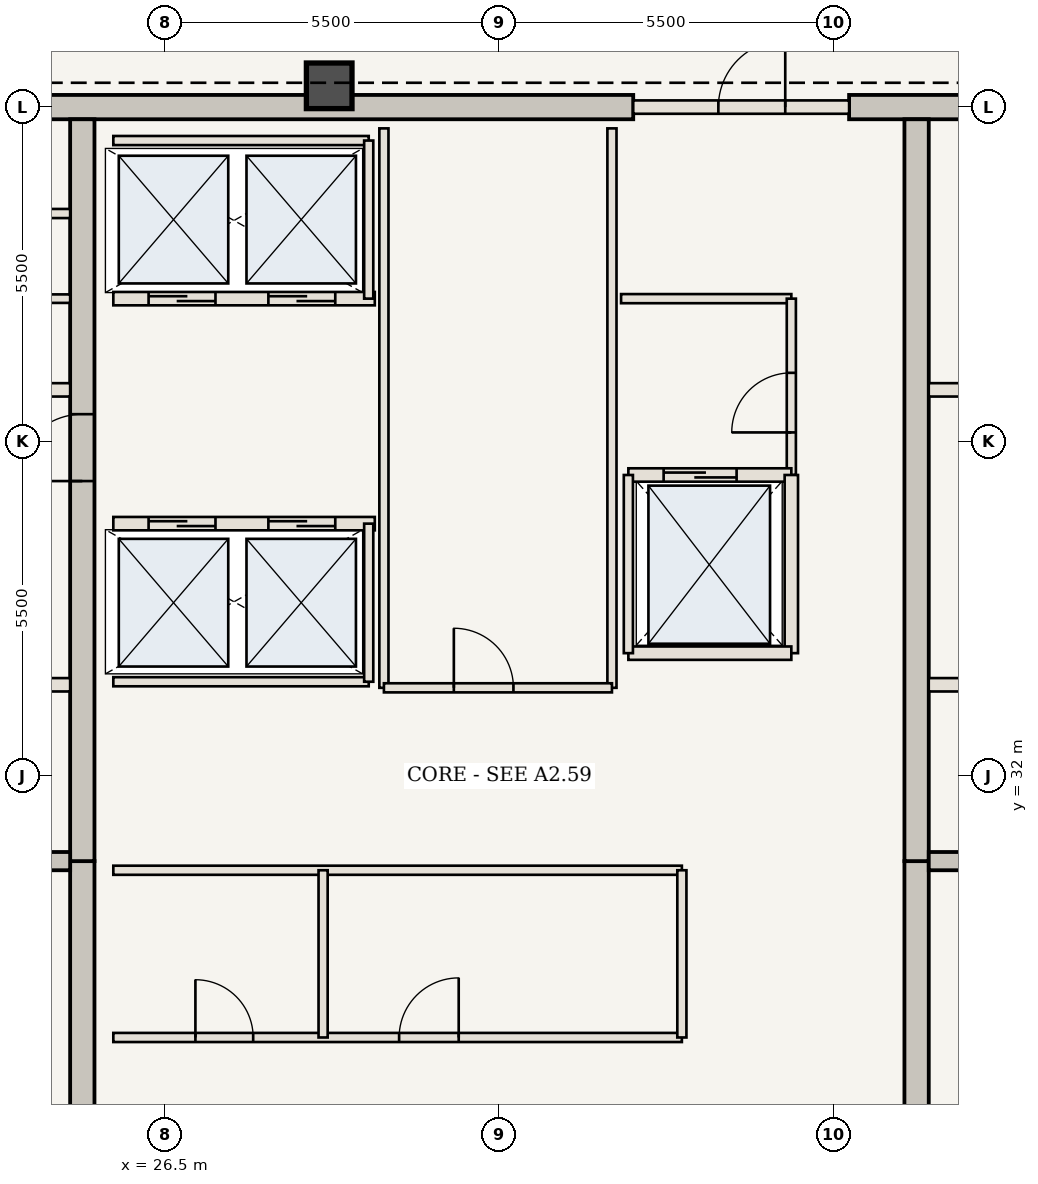
"""IFC4 building model, lengths in metres.
Left out: names, types, materials, properties, quantities, classifications, styles, units other than length and angle.
Written with IfcOpenShell. Run it as: python <this file> out.ifc"""

import sys

from ifc_helpers import new_model, si_unit, direction, frame, frame_2d, origin, origin_2d, place, context, subcontext, project, spatial, rectangle, extrude, element, fill, save


model = new_model("IFC4")
c1 = context("Model", 3, precision=1e-05, world=origin(), true_north=direction((0.0, 1.0)))
c2 = subcontext(c1, "Body", "Model", "MODEL_VIEW")
j1 = project(units=[si_unit("LENGTHUNIT", "METRE"), si_unit("PLANEANGLEUNIT", "RADIAN")], contexts=[c1])
p1 = place(None, origin())
s1 = spatial("IfcSite", under=j1, at=p1, CompositionType="ELEMENT")
p2 = place(p1, origin())
s2 = spatial("IfcBuilding", under=s1, at=p2, CompositionType="ELEMENT")
p3 = place(p2, frame((0.0, 0.0, 269.85)))
s3 = spatial("IfcBuildingStorey", under=s2, at=p3, CompositionType="ELEMENT", Elevation=269.85)
p4 = place(p3, frame((21.41, 43.0, 0.0), z_axis=(0.0, 0.0, 1.0), x_axis=(1.0, 0.0, 0.0)))
e1 = element("IfcWall", 1, at=p4, inside=s3, PredefinedType="SHEAR", context=c2, shape_type="SweptSolid", body=[
    extrude(rectangle(XDim=12.79, YDim=0.4, at=frame_2d((6.395, 0.0))), origin(), (0.0, 0.0, 1.0), 3.85),
])
p5 = place(p3, frame((37.75, 43.0, 0.0), z_axis=(0.0, 0.0, 1.0), x_axis=(1.0, 0.0, 0.0)))
e2 = element("IfcWall", 2, at=p5, inside=s3, PredefinedType="SHEAR", context=c2, shape_type="SweptSolid", body=[
    extrude(rectangle(XDim=4.84, YDim=0.4, at=frame_2d((2.42, 0.0))), origin(), (0.0, 0.0, 1.0), 3.85),
])
p6 = place(p3, frame((25.14, 21.15, 0.0), z_axis=(0.0, 0.0, 1.0), x_axis=(0.0, 1.0, 0.0)))
e3 = element("IfcWall", 3, at=p6, inside=s3, PredefinedType="SHEAR", context=c2, shape_type="SweptSolid", body=[
    extrude(rectangle(XDim=9.45, YDim=0.4, at=frame_2d((4.725, 0.0))), origin(), (0.0, 0.0, 1.0), 3.85),
])
p7 = place(p3, frame((25.14, 30.6, 0.0), z_axis=(0.0, 0.0, 1.0), x_axis=(0.0, 1.0, 0.0)))
e4 = element("IfcWall", 4, at=p7, inside=s3, PredefinedType="SHEAR", context=c2, shape_type="SweptSolid", body=[
    extrude(rectangle(XDim=12.2, YDim=0.4, at=frame_2d((6.1, 0.0))), origin(), (0.0, 0.0, 1.0), 3.85),
])
p8 = place(p7, frame((6.25, 0.0, 0.0)))
e5 = element("IfcOpeningElement", 5, at=p8, cuts=e4, PredefinedType="OPENING", context=c2, shape_type="SweptSolid", body=[
    extrude(rectangle(XDim=1.1, YDim=2.15, at=frame_2d((0.55, 1.075))), frame((0.0, 0.21, 0.0), z_axis=(0.0, -1.0, 0.0), x_axis=(1.0, 0.0, 0.0)), (0.0, 0.0, 1.0), 0.42),
])
p9 = place(p3, frame((38.86, 21.15, 0.0), z_axis=(0.0, 0.0, 1.0), x_axis=(0.0, 1.0, 0.0)))
e6 = element("IfcWall", 6, at=p9, inside=s3, PredefinedType="SHEAR", context=c2, shape_type="SweptSolid", body=[
    extrude(rectangle(XDim=9.45, YDim=0.4, at=frame_2d((4.725, 0.0))), origin(), (0.0, 0.0, 1.0), 3.85),
])
p10 = place(p3, frame((38.86, 30.6, 0.0), z_axis=(0.0, 0.0, 1.0), x_axis=(0.0, 1.0, 0.0)))
e7 = element("IfcWall", 7, at=p10, inside=s3, PredefinedType="SHEAR", context=c2, shape_type="SweptSolid", body=[
    extrude(rectangle(XDim=12.2, YDim=0.4, at=frame_2d((6.1, 0.0))), origin(), (0.0, 0.0, 1.0), 3.85),
])
p11 = place(p3, frame((29.2, 43.35, 0.0), z_axis=(0.0, 0.0, 1.0), x_axis=(1.0, 0.0, 0.0)))
e8 = element("IfcColumn", 8, at=p11, inside=s3, PredefinedType="COLUMN", context=c2, shape_type="SweptSolid", body=[
    extrude(rectangle(XDim=0.75, YDim=0.75, at=origin_2d()), origin(), (0.0, 0.0, 1.0), 3.85),
])
for number, where, z_axis, x_axis in (
    (9, (21.41, 30.6, 0.0), (0.0, 0.0, 1.0), (1.0, 0.0, 0.0)),
    (10, (39.06, 30.6, 0.0), (0.0, 0.0, 1.0), (1.0, 0.0, 0.0)),
):
    element("IfcWall", number, at=place(p3, frame(where, z_axis=z_axis, x_axis=x_axis)), inside=s3, PredefinedType="SHEAR", context=c2, shape_type="SweptSolid", body=[
        extrude(rectangle(XDim=3.53, YDim=0.3, at=frame_2d((1.765, 0.0))), origin(), (0.0, 0.0, 1.0), 3.685),
    ])
p12 = place(p3, frame((21.41, 33.5, 0.0), z_axis=(0.0, 0.0, 1.0), x_axis=(1.0, 0.0, 0.0)))
e11 = element("IfcWall", 11, at=p12, inside=s3, PredefinedType="STANDARD", context=c2, shape_type="SweptSolid", body=[
    extrude(rectangle(XDim=3.53, YDim=0.22, at=frame_2d((1.765, 0.0))), origin(), (0.0, 0.0, 1.0), 3.685),
])
p13 = place(p12, frame((0.75, 0.0, 0.0)))
e12 = element("IfcOpeningElement", 12, at=p13, cuts=e11, PredefinedType="OPENING", context=c2, shape_type="SweptSolid", body=[
    extrude(rectangle(XDim=1.2, YDim=2.2, at=frame_2d((0.6, 1.1))), frame((0.0, 0.12, 0.0), z_axis=(0.0, -1.0, 0.0), x_axis=(1.0, 0.0, 0.0)), (0.0, 0.0, 1.0), 0.24),
])
p14 = place(p3, frame((39.06, 33.5, 0.0), z_axis=(0.0, 0.0, 1.0), x_axis=(1.0, 0.0, 0.0)))
e13 = element("IfcWall", 13, at=p14, inside=s3, PredefinedType="STANDARD", context=c2, shape_type="SweptSolid", body=[
    extrude(rectangle(XDim=3.53, YDim=0.22, at=frame_2d((1.765, 0.0))), origin(), (0.0, 0.0, 1.0), 3.685),
])
p15 = place(p14, frame((1.55, 0.0, 0.0)))
e14 = element("IfcOpeningElement", 14, at=p15, cuts=e13, PredefinedType="OPENING", context=c2, shape_type="SweptSolid", body=[
    extrude(rectangle(XDim=1.2, YDim=2.2, at=frame_2d((0.6, 1.1))), frame((0.0, 0.12, 0.0), z_axis=(0.0, -1.0, 0.0), x_axis=(1.0, 0.0, 0.0)), (0.0, 0.0, 1.0), 0.24),
])
for number, where, z_axis, x_axis in (
    (15, (21.41, 38.35, 0.0), (0.0, 0.0, 1.0), (1.0, 0.0, 0.0)),
    (16, (39.06, 38.35, 0.0), (0.0, 0.0, 1.0), (1.0, 0.0, 0.0)),
):
    element("IfcWall", number, at=place(p3, frame(where, z_axis=z_axis, x_axis=x_axis)), inside=s3, PredefinedType="STANDARD", context=c2, shape_type="SweptSolid", body=[
        extrude(rectangle(XDim=3.53, YDim=0.22, at=frame_2d((1.765, 0.0))), origin(), (0.0, 0.0, 1.0), 3.685),
    ])
p16 = place(p3, frame((21.41, 39.85, 0.0), z_axis=(0.0, 0.0, 1.0), x_axis=(1.0, 0.0, 0.0)))
e17 = element("IfcWall", 17, at=p16, inside=s3, PredefinedType="STANDARD", context=c2, shape_type="SweptSolid", body=[
    extrude(rectangle(XDim=3.53, YDim=0.14, at=frame_2d((1.765, 0.0))), origin(), (0.0, 0.0, 1.0), 3.685),
])
p17 = place(p3, frame((21.41, 41.25, 0.0), z_axis=(0.0, 0.0, 1.0), x_axis=(1.0, 0.0, 0.0)))
e18 = element("IfcWall", 18, at=p17, inside=s3, PredefinedType="STANDARD", context=c2, shape_type="SweptSolid", body=[
    extrude(rectangle(XDim=3.53, YDim=0.15, at=frame_2d((1.765, 0.0))), origin(), (0.0, 0.0, 1.0), 3.685),
])
p18 = place(p3, frame((34.0, 39.85, 0.0), z_axis=(0.0, 0.0, 1.0), x_axis=(1.0, 0.0, 0.0)))
e19 = element("IfcWall", 19, at=p18, inside=s3, PredefinedType="STANDARD", context=c2, shape_type="SweptSolid", body=[
    extrude(rectangle(XDim=2.8, YDim=0.15, at=frame_2d((1.4, 0.0))), origin(), (0.0, 0.0, 1.0), 3.685),
])
p19 = place(p3, frame((36.8, 36.95, 0.0), z_axis=(0.0, 0.0, 1.0), x_axis=(0.0, 1.0, 0.0)))
e20 = element("IfcWall", 20, at=p19, inside=s3, PredefinedType="STANDARD", context=c2, shape_type="SweptSolid", body=[
    extrude(rectangle(XDim=2.9, YDim=0.15, at=frame_2d((1.45, 0.0))), origin(), (0.0, 0.0, 1.0), 3.685),
])
p20 = place(p19, frame((0.7, 0.0, 0.0)))
e21 = element("IfcOpeningElement", 21, at=p20, cuts=e20, PredefinedType="OPENING", context=c2, shape_type="SweptSolid", body=[
    extrude(rectangle(XDim=0.98, YDim=2.2, at=frame_2d((0.49, 1.1))), frame((0.0, 0.085, 0.0), z_axis=(0.0, -1.0, 0.0), x_axis=(1.0, 0.0, 0.0)), (0.0, 0.0, 1.0), 0.17),
])
p21 = place(p3, frame((25.65, 27.7, 0.0), z_axis=(0.0, 0.0, 1.0), x_axis=(1.0, 0.0, 0.0)))
e22 = element("IfcWall", 22, at=p21, inside=s3, PredefinedType="STANDARD", context=c2, shape_type="SweptSolid", body=[
    extrude(rectangle(XDim=9.35, YDim=0.15, at=frame_2d((4.675, 0.0))), origin(), (0.0, 0.0, 1.0), 3.685),
])
p22 = place(p21, frame((1.35, 0.0, 0.0)))
e23 = element("IfcOpeningElement", 23, at=p22, cuts=e22, PredefinedType="OPENING", context=c2, shape_type="SweptSolid", body=[
    extrude(rectangle(XDim=0.95, YDim=2.15, at=frame_2d((0.475, 1.075))), frame((0.0, 0.085, 0.0), z_axis=(0.0, -1.0, 0.0), x_axis=(1.0, 0.0, 0.0)), (0.0, 0.0, 1.0), 0.17),
])
p23 = place(p21, frame((4.7, 0.0, 0.0)))
e24 = element("IfcOpeningElement", 24, at=p23, cuts=e22, PredefinedType="OPENING", context=c2, shape_type="SweptSolid", body=[
    extrude(rectangle(XDim=0.98, YDim=2.2, at=frame_2d((0.49, 1.1))), frame((0.0, 0.085, 0.0), z_axis=(0.0, -1.0, 0.0), x_axis=(1.0, 0.0, 0.0)), (0.0, 0.0, 1.0), 0.17),
])
p24 = place(p3, frame((25.65, 30.45, 0.0), z_axis=(0.0, 0.0, 1.0), x_axis=(1.0, 0.0, 0.0)))
e25 = element("IfcWall", 25, at=p24, inside=s3, PredefinedType="STANDARD", context=c2, shape_type="SweptSolid", body=[
    extrude(rectangle(XDim=9.35, YDim=0.15, at=frame_2d((4.675, 0.0))), origin(), (0.0, 0.0, 1.0), 3.685),
])
for number, where, z_axis, x_axis in (
    (26, (29.1, 27.7, 0.0), (0.0, 0.0, 1.0), (0.0, 1.0, 0.0)),
    (27, (35.0, 27.7, 0.0), (0.0, 0.0, 1.0), (0.0, 1.0, 0.0)),
):
    element("IfcWall", number, at=place(p3, frame(where, z_axis=z_axis, x_axis=x_axis)), inside=s3, PredefinedType="STANDARD", context=c2, shape_type="SweptSolid", body=[
        extrude(rectangle(XDim=2.75, YDim=0.15, at=frame_2d((1.375, 0.0))), origin(), (0.0, 0.0, 1.0), 3.685),
    ])
p25 = place(p3, frame((25.65, 36.15, 0.0), z_axis=(0.0, 0.0, 1.0), x_axis=(1.0, 0.0, 0.0)))
e28 = element("IfcWall", 28, at=p25, inside=s3, PredefinedType="STANDARD", context=c2, shape_type="SweptSolid", body=[
    extrude(rectangle(XDim=4.3, YDim=0.22, at=frame_2d((2.15, 0.0))), origin(), (0.0, 0.0, 1.0), 3.685),
])
p26 = place(p25, frame((0.58, 0.0, 0.0)))
e29 = element("IfcOpeningElement", 29, at=p26, cuts=e28, PredefinedType="OPENING", context=c2, shape_type="SweptSolid", body=[
    extrude(rectangle(XDim=1.1, YDim=2.15, at=frame_2d((0.55, 1.075))), frame((0.0, 0.12, 0.0), z_axis=(0.0, -1.0, 0.0), x_axis=(1.0, 0.0, 0.0)), (0.0, 0.0, 1.0), 0.24),
])
p27 = place(p25, frame((2.55, 0.0, 0.0)))
e30 = element("IfcOpeningElement", 30, at=p27, cuts=e28, PredefinedType="OPENING", context=c2, shape_type="SweptSolid", body=[
    extrude(rectangle(XDim=1.1, YDim=2.15, at=frame_2d((0.55, 1.075))), frame((0.0, 0.12, 0.0), z_axis=(0.0, -1.0, 0.0), x_axis=(1.0, 0.0, 0.0)), (0.0, 0.0, 1.0), 0.24),
])
p28 = place(p3, frame((25.65, 33.55, 0.0), z_axis=(0.0, 0.0, 1.0), x_axis=(1.0, 0.0, 0.0)))
e31 = element("IfcWall", 31, at=p28, inside=s3, PredefinedType="STANDARD", context=c2, shape_type="SweptSolid", body=[
    extrude(rectangle(XDim=4.2, YDim=0.15, at=frame_2d((2.1, 0.0))), origin(), (0.0, 0.0, 1.0), 3.685),
])
p29 = place(p3, frame((29.85, 33.55, 0.0), z_axis=(0.0, 0.0, 1.0), x_axis=(0.0, 1.0, 0.0)))
e32 = element("IfcWall", 32, at=p29, inside=s3, PredefinedType="STANDARD", context=c2, shape_type="SweptSolid", body=[
    extrude(rectangle(XDim=2.6, YDim=0.15, at=frame_2d((1.3, 0.0))), origin(), (0.0, 0.0, 1.0), 3.685),
])
p30 = place(p3, frame((25.65, 39.85, 0.0), z_axis=(0.0, 0.0, 1.0), x_axis=(1.0, 0.0, 0.0)))
e33 = element("IfcWall", 33, at=p30, inside=s3, PredefinedType="STANDARD", context=c2, shape_type="SweptSolid", body=[
    extrude(rectangle(XDim=4.3, YDim=0.22, at=frame_2d((2.15, 0.0))), origin(), (0.0, 0.0, 1.0), 3.685),
])
p31 = place(p30, frame((0.58, 0.0, 0.0)))
e34 = element("IfcOpeningElement", 34, at=p31, cuts=e33, PredefinedType="OPENING", context=c2, shape_type="SweptSolid", body=[
    extrude(rectangle(XDim=1.1, YDim=2.15, at=frame_2d((0.55, 1.075))), frame((0.0, 0.12, 0.0), z_axis=(0.0, -1.0, 0.0), x_axis=(1.0, 0.0, 0.0)), (0.0, 0.0, 1.0), 0.24),
])
p32 = place(p30, frame((2.55, 0.0, 0.0)))
e35 = element("IfcOpeningElement", 35, at=p32, cuts=e33, PredefinedType="OPENING", context=c2, shape_type="SweptSolid", body=[
    extrude(rectangle(XDim=1.1, YDim=2.15, at=frame_2d((0.55, 1.075))), frame((0.0, 0.12, 0.0), z_axis=(0.0, -1.0, 0.0), x_axis=(1.0, 0.0, 0.0)), (0.0, 0.0, 1.0), 0.24),
])
p33 = place(p3, frame((25.65, 42.45, 0.0), z_axis=(0.0, 0.0, 1.0), x_axis=(1.0, 0.0, 0.0)))
e36 = element("IfcWall", 36, at=p33, inside=s3, PredefinedType="STANDARD", context=c2, shape_type="SweptSolid", body=[
    extrude(rectangle(XDim=4.2, YDim=0.15, at=frame_2d((2.1, 0.0))), origin(), (0.0, 0.0, 1.0), 3.685),
])
p34 = place(p3, frame((29.85, 39.85, 0.0), z_axis=(0.0, 0.0, 1.0), x_axis=(0.0, 1.0, 0.0)))
e37 = element("IfcWall", 37, at=p34, inside=s3, PredefinedType="STANDARD", context=c2, shape_type="SweptSolid", body=[
    extrude(rectangle(XDim=2.6, YDim=0.15, at=frame_2d((1.3, 0.0))), origin(), (0.0, 0.0, 1.0), 3.685),
])
for number, where, z_axis, x_axis in (
    (38, (30.1, 33.45, 0.0), (0.0, 0.0, 1.0), (0.0, 1.0, 0.0)),
    (39, (33.85, 33.45, 0.0), (0.0, 0.0, 1.0), (0.0, 1.0, 0.0)),
):
    element("IfcWall", number, at=place(p3, frame(where, z_axis=z_axis, x_axis=x_axis)), inside=s3, PredefinedType="STANDARD", context=c2, shape_type="SweptSolid", body=[
        extrude(rectangle(XDim=9.2, YDim=0.15, at=frame_2d((4.6, 0.0))), origin(), (0.0, 0.0, 1.0), 3.685),
    ])
p35 = place(p3, frame((30.1, 33.45, 0.0), z_axis=(0.0, 0.0, 1.0), x_axis=(1.0, 0.0, 0.0)))
e40 = element("IfcWall", 40, at=p35, inside=s3, PredefinedType="STANDARD", context=c2, shape_type="SweptSolid", body=[
    extrude(rectangle(XDim=3.75, YDim=0.15, at=frame_2d((1.875, 0.0))), origin(), (0.0, 0.0, 1.0), 3.685),
])
p36 = place(p35, frame((1.15, 0.0, 0.0)))
e41 = element("IfcOpeningElement", 41, at=p36, cuts=e40, PredefinedType="OPENING", context=c2, shape_type="SweptSolid", body=[
    extrude(rectangle(XDim=0.98, YDim=2.2, at=frame_2d((0.49, 1.1))), frame((0.0, 0.085, 0.0), z_axis=(0.0, -1.0, 0.0), x_axis=(1.0, 0.0, 0.0)), (0.0, 0.0, 1.0), 0.17),
])
p37 = place(p3, frame((34.2, 43.0, 0.0), z_axis=(0.0, 0.0, 1.0), x_axis=(1.0, 0.0, 0.0)))
e42 = element("IfcWall", 42, at=p37, inside=s3, PredefinedType="STANDARD", context=c2, shape_type="SweptSolid", body=[
    extrude(rectangle(XDim=3.55, YDim=0.22, at=frame_2d((1.775, 0.0))), origin(), (0.0, 0.0, 1.0), 3.685),
])
p38 = place(p37, frame((1.4, 0.0, 0.0)))
e43 = element("IfcOpeningElement", 43, at=p38, cuts=e42, PredefinedType="OPENING", context=c2, shape_type="SweptSolid", body=[
    extrude(rectangle(XDim=1.1, YDim=2.15, at=frame_2d((0.55, 1.075))), frame((0.0, 0.12, 0.0), z_axis=(0.0, -1.0, 0.0), x_axis=(1.0, 0.0, 0.0)), (0.0, 0.0, 1.0), 0.24),
])
p39 = place(p3, frame((34.12, 36.95, 0.0), z_axis=(0.0, 0.0, 1.0), x_axis=(1.0, 0.0, 0.0)))
e44 = element("IfcWall", 44, at=p39, inside=s3, PredefinedType="STANDARD", context=c2, shape_type="SweptSolid", body=[
    extrude(rectangle(XDim=2.68, YDim=0.22, at=frame_2d((1.34, 0.0))), origin(), (0.0, 0.0, 1.0), 3.685),
])
p40 = place(p39, frame((0.58, 0.0, 0.0)))
e45 = element("IfcOpeningElement", 45, at=p40, cuts=e44, PredefinedType="OPENING", context=c2, shape_type="SweptSolid", body=[
    extrude(rectangle(XDim=1.2, YDim=2.2, at=frame_2d((0.6, 1.1))), frame((0.0, 0.12, 0.0), z_axis=(0.0, -1.0, 0.0), x_axis=(1.0, 0.0, 0.0)), (0.0, 0.0, 1.0), 0.24),
])
p41 = place(p3, frame((36.8, 34.02, 0.0), z_axis=(0.0, 0.0, 1.0), x_axis=(0.0, 1.0, 0.0)))
e46 = element("IfcWall", 46, at=p41, inside=s3, PredefinedType="STANDARD", context=c2, shape_type="SweptSolid", body=[
    extrude(rectangle(XDim=2.93, YDim=0.22, at=frame_2d((1.465, 0.0))), origin(), (0.0, 0.0, 1.0), 3.685),
])
p42 = place(p3, frame((34.12, 34.02, 0.0), z_axis=(0.0, 0.0, 1.0), x_axis=(1.0, 0.0, 0.0)))
e47 = element("IfcWall", 47, at=p42, inside=s3, PredefinedType="STANDARD", context=c2, shape_type="SweptSolid", body=[
    extrude(rectangle(XDim=2.68, YDim=0.22, at=frame_2d((1.34, 0.0))), origin(), (0.0, 0.0, 1.0), 3.685),
])
p43 = place(p3, frame((34.12, 34.02, 0.0), z_axis=(0.0, 0.0, 1.0), x_axis=(0.0, 1.0, 0.0)))
e48 = element("IfcWall", 48, at=p43, inside=s3, PredefinedType="STANDARD", context=c2, shape_type="SweptSolid", body=[
    extrude(rectangle(XDim=2.93, YDim=0.15, at=frame_2d((1.465, 0.0))), origin(), (0.0, 0.0, 1.0), 3.685),
])
p44 = place(p8, origin())
e49 = element("IfcDoor", 49, at=p44, inside=s3, OperationType="SINGLE_SWING_LEFT", PredefinedType="DOOR", context=c2, shape_type="SweptSolid", body=[
    extrude(rectangle(XDim=1.1, YDim=2.15, at=frame_2d((0.55, 1.075))), frame((0.0, 0.025, 0.0), z_axis=(0.0, -1.0, 0.0), x_axis=(1.0, 0.0, 0.0)), (0.0, 0.0, 1.0), 0.05),
])
fill(e5, e49)
p45 = place(p20, origin())
e50 = element("IfcDoor", 50, at=p45, inside=s3, OperationType="SINGLE_SWING_LEFT", PredefinedType="DOOR", context=c2, shape_type="SweptSolid", body=[
    extrude(rectangle(XDim=0.98, YDim=2.2, at=frame_2d((0.49, 1.1))), frame((0.0, 0.025, 0.0), z_axis=(0.0, -1.0, 0.0), x_axis=(1.0, 0.0, 0.0)), (0.0, 0.0, 1.0), 0.05),
])
fill(e21, e50)
p46 = place(p22, origin())
e51 = element("IfcDoor", 51, at=p46, inside=s3, OperationType="SINGLE_SWING_LEFT", PredefinedType="DOOR", context=c2, shape_type="SweptSolid", body=[
    extrude(rectangle(XDim=0.95, YDim=2.15, at=frame_2d((0.475, 1.075))), frame((0.0, 0.025, 0.0), z_axis=(0.0, -1.0, 0.0), x_axis=(1.0, 0.0, 0.0)), (0.0, 0.0, 1.0), 0.05),
])
fill(e23, e51)
p47 = place(p23, origin())
e52 = element("IfcDoor", 52, at=p47, inside=s3, OperationType="SINGLE_SWING_RIGHT", PredefinedType="DOOR", context=c2, shape_type="SweptSolid", body=[
    extrude(rectangle(XDim=0.98, YDim=2.2, at=frame_2d((0.49, 1.1))), frame((0.0, 0.025, 0.0), z_axis=(0.0, -1.0, 0.0), x_axis=(1.0, 0.0, 0.0)), (0.0, 0.0, 1.0), 0.05),
])
fill(e24, e52)
p48 = place(p26, origin())
e53 = element("IfcDoor", 53, at=p48, inside=s3, OperationType="DOUBLE_DOOR_SLIDING", PredefinedType="DOOR", context=c2, shape_type="SweptSolid", body=[
    extrude(rectangle(XDim=1.1, YDim=2.15, at=frame_2d((0.55, 1.075))), frame((0.0, 0.025, 0.0), z_axis=(0.0, -1.0, 0.0), x_axis=(1.0, 0.0, 0.0)), (0.0, 0.0, 1.0), 0.05),
])
fill(e29, e53)
p49 = place(p27, origin())
e54 = element("IfcDoor", 54, at=p49, inside=s3, OperationType="DOUBLE_DOOR_SLIDING", PredefinedType="DOOR", context=c2, shape_type="SweptSolid", body=[
    extrude(rectangle(XDim=1.1, YDim=2.15, at=frame_2d((0.55, 1.075))), frame((0.0, 0.025, 0.0), z_axis=(0.0, -1.0, 0.0), x_axis=(1.0, 0.0, 0.0)), (0.0, 0.0, 1.0), 0.05),
])
fill(e30, e54)
p50 = place(p31, origin())
e55 = element("IfcDoor", 55, at=p50, inside=s3, OperationType="DOUBLE_DOOR_SLIDING", PredefinedType="DOOR", context=c2, shape_type="SweptSolid", body=[
    extrude(rectangle(XDim=1.1, YDim=2.15, at=frame_2d((0.55, 1.075))), frame((0.0, 0.025, 0.0), z_axis=(0.0, -1.0, 0.0), x_axis=(1.0, 0.0, 0.0)), (0.0, 0.0, 1.0), 0.05),
])
fill(e34, e55)
p51 = place(p32, origin())
e56 = element("IfcDoor", 56, at=p51, inside=s3, OperationType="DOUBLE_DOOR_SLIDING", PredefinedType="DOOR", context=c2, shape_type="SweptSolid", body=[
    extrude(rectangle(XDim=1.1, YDim=2.15, at=frame_2d((0.55, 1.075))), frame((0.0, 0.025, 0.0), z_axis=(0.0, -1.0, 0.0), x_axis=(1.0, 0.0, 0.0)), (0.0, 0.0, 1.0), 0.05),
])
fill(e35, e56)
p52 = place(p36, origin())
e57 = element("IfcDoor", 57, at=p52, inside=s3, OperationType="SINGLE_SWING_LEFT", PredefinedType="DOOR", context=c2, shape_type="SweptSolid", body=[
    extrude(rectangle(XDim=0.98, YDim=2.2, at=frame_2d((0.49, 1.1))), frame((0.0, 0.025, 0.0), z_axis=(0.0, -1.0, 0.0), x_axis=(1.0, 0.0, 0.0)), (0.0, 0.0, 1.0), 0.05),
])
fill(e41, e57)
p53 = place(p38, origin())
e58 = element("IfcDoor", 58, at=p53, inside=s3, OperationType="SINGLE_SWING_RIGHT", PredefinedType="DOOR", context=c2, shape_type="SweptSolid", body=[
    extrude(rectangle(XDim=1.1, YDim=2.15, at=frame_2d((0.55, 1.075))), frame((0.0, 0.025, 0.0), z_axis=(0.0, -1.0, 0.0), x_axis=(1.0, 0.0, 0.0)), (0.0, 0.0, 1.0), 0.05),
])
fill(e43, e58)
p54 = place(p40, origin())
e59 = element("IfcDoor", 59, at=p54, inside=s3, OperationType="DOUBLE_DOOR_SLIDING", PredefinedType="DOOR", context=c2, shape_type="SweptSolid", body=[
    extrude(rectangle(XDim=1.2, YDim=2.2, at=frame_2d((0.6, 1.1))), frame((0.0, 0.025, 0.0), z_axis=(0.0, -1.0, 0.0), x_axis=(1.0, 0.0, 0.0)), (0.0, 0.0, 1.0), 0.05),
])
fill(e45, e59)
save(model, sys.argv[1])
